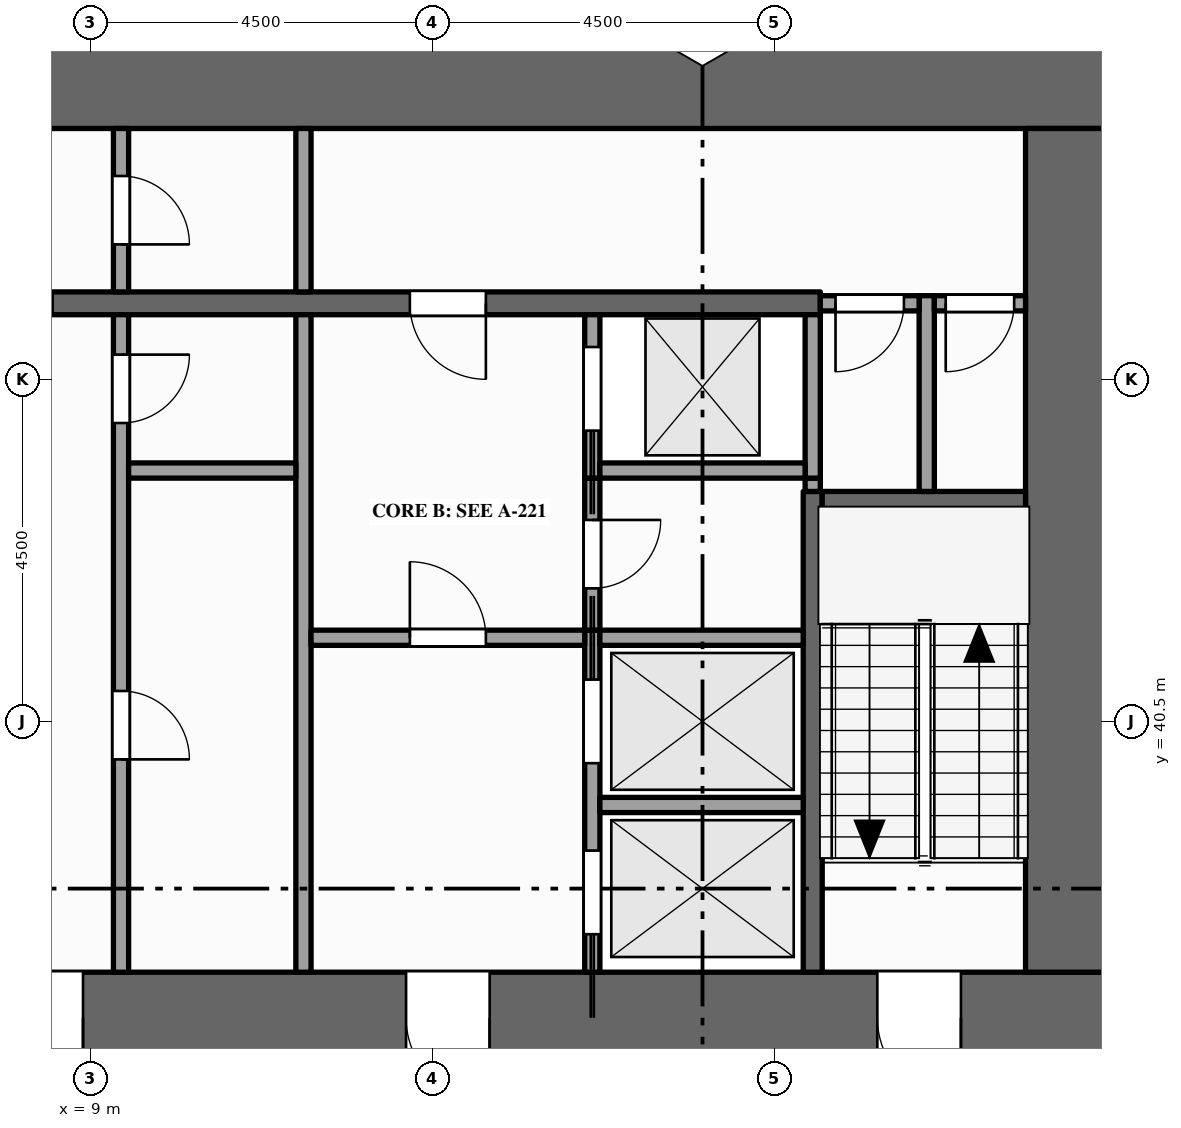
"""IFC4 building model, lengths in metres.
Left out: names, types, materials, properties, quantities, classifications, styles, units other than length and angle.
Written with IfcOpenShell. Run it as: python <this file> out.ifc"""

import sys

from ifc_helpers import new_model, si_unit, direction, frame, frame_2d, origin, place, context, subcontext, project, spatial, rectangle, extrude, element, fill, save


model = new_model("IFC4")
c1 = context("Model", 3, precision=1e-05, world=origin(), true_north=direction((0.0, 1.0)))
c2 = subcontext(c1, "Body", "Model", "MODEL_VIEW")
j1 = project(units=[si_unit("LENGTHUNIT", "METRE"), si_unit("PLANEANGLEUNIT", "RADIAN")], contexts=[c1])
p1 = place(None, origin())
s1 = spatial("IfcSite", under=j1, at=p1, CompositionType="ELEMENT")
p2 = place(p1, origin())
s2 = spatial("IfcBuilding", under=s1, at=p2, CompositionType="ELEMENT")
p3 = place(p2, frame((0.0, 0.0, 119.0)))
s3 = spatial("IfcBuildingStorey", under=s2, at=p3, CompositionType="ELEMENT", Elevation=119.0)
p4 = place(p3, frame((0.0, 36.6, -0.15), z_axis=(0.0, 0.0, 1.0), x_axis=(1.0, 0.0, 0.0)))
e1 = element("IfcWall", 1, at=p4, inside=s3, PredefinedType="SHEAR", context=c2, shape_type="SweptSolid", body=[
    extrude(rectangle(XDim=22.5, YDim=1.2, at=frame_2d((11.25, 0.0))), origin(), (0.0, 0.0, 1.0), 4.0),
])
p5 = place(p4, frame((7.1, 0.0, 0.15)))
e2 = element("IfcOpeningElement", 2, at=p5, cuts=e1, PredefinedType="OPENING", context=c2, shape_type="SweptSolid", body=[
    extrude(rectangle(XDim=1.8, YDim=2.1, at=frame_2d((0.9, 1.05))), frame((0.0, 0.61, 0.0), z_axis=(0.0, -1.0, 0.0), x_axis=(1.0, 0.0, 0.0)), (0.0, 0.0, 1.0), 1.22),
])
p6 = place(p4, frame((13.15, 0.0, 0.15)))
e3 = element("IfcOpeningElement", 3, at=p6, cuts=e1, PredefinedType="OPENING", context=c2, shape_type="SweptSolid", body=[
    extrude(rectangle(XDim=1.1, YDim=2.1, at=frame_2d((0.55, 1.05))), frame((0.0, 0.61, 0.0), z_axis=(0.0, -1.0, 0.0), x_axis=(1.0, 0.0, 0.0)), (0.0, 0.0, 1.0), 1.22),
])
p7 = place(p4, frame((2.15, 0.0, 0.15)))
e4 = element("IfcOpeningElement", 4, at=p7, cuts=e1, PredefinedType="OPENING", context=c2, shape_type="SweptSolid", body=[
    extrude(rectangle(XDim=1.1, YDim=2.1, at=frame_2d((0.55, 1.05))), frame((0.0, 0.61, 0.0), z_axis=(0.0, -1.0, 0.0), x_axis=(1.0, 0.0, 0.0)), (0.0, 0.0, 1.0), 1.22),
])
p8 = place(p4, frame((19.35, 0.0, 0.15)))
e5 = element("IfcOpeningElement", 5, at=p8, cuts=e1, PredefinedType="OPENING", context=c2, shape_type="SweptSolid", body=[
    extrude(rectangle(XDim=1.1, YDim=2.1, at=frame_2d((0.55, 1.05))), frame((0.0, 0.61, 0.0), z_axis=(0.0, -1.0, 0.0), x_axis=(1.0, 0.0, 0.0)), (0.0, 0.0, 1.0), 1.22),
])
p9 = place(p3, frame((0.0, 48.9, -0.15), z_axis=(0.0, 0.0, 1.0), x_axis=(1.0, 0.0, 0.0)))
e6 = element("IfcWall", 6, at=p9, inside=s3, PredefinedType="SHEAR", context=c2, shape_type="SweptSolid", body=[
    extrude(rectangle(XDim=22.5, YDim=1.2, at=frame_2d((11.25, 0.0))), origin(), (0.0, 0.0, 1.0), 4.0),
])
p10 = place(p3, frame((21.9, 37.2, -0.15), z_axis=(0.0, 0.0, 1.0), x_axis=(0.0, 1.0, 0.0)))
e7 = element("IfcWall", 7, at=p10, inside=s3, PredefinedType="SHEAR", context=c2, shape_type="SweptSolid", body=[
    extrude(rectangle(XDim=11.1, YDim=1.2, at=frame_2d((5.55, 0.0))), origin(), (0.0, 0.0, 1.0), 4.0),
])
p11 = place(p3, frame((9.4, 37.2, 0.0), z_axis=(0.0, 0.0, 1.0), x_axis=(0.0, 1.0, 0.0)))
e8 = element("IfcWall", 8, at=p11, inside=s3, PredefinedType="PARTITIONING", context=c2, shape_type="SweptSolid", body=[
    extrude(rectangle(XDim=8.65, YDim=0.2, at=frame_2d((4.325, 0.0))), origin(), (0.0, 0.0, 1.0), 3.85),
])
p12 = place(p11, frame((2.8, 0.0, 0.0)))
e9 = element("IfcOpeningElement", 9, at=p12, cuts=e8, PredefinedType="OPENING", context=c2, shape_type="SweptSolid", body=[
    extrude(rectangle(XDim=0.9, YDim=2.1, at=frame_2d((0.45, 1.05))), frame((0.0, 0.11, 0.0), z_axis=(0.0, -1.0, 0.0), x_axis=(1.0, 0.0, 0.0)), (0.0, 0.0, 1.0), 0.22),
])
p13 = place(p11, frame((7.225, 0.0, 0.0)))
e10 = element("IfcOpeningElement", 10, at=p13, cuts=e8, PredefinedType="OPENING", context=c2, shape_type="SweptSolid", body=[
    extrude(rectangle(XDim=0.9, YDim=2.1, at=frame_2d((0.45, 1.05))), frame((0.0, 0.11, 0.0), z_axis=(0.0, -1.0, 0.0), x_axis=(1.0, 0.0, 0.0)), (0.0, 0.0, 1.0), 0.22),
])
p14 = place(p3, frame((9.4, 46.15, 0.0), z_axis=(0.0, 0.0, 1.0), x_axis=(0.0, 1.0, 0.0)))
e11 = element("IfcWall", 11, at=p14, inside=s3, PredefinedType="PARTITIONING", context=c2, shape_type="SweptSolid", body=[
    extrude(rectangle(XDim=2.15, YDim=0.2, at=frame_2d((1.075, 0.0))), origin(), (0.0, 0.0, 1.0), 3.85),
])
p15 = place(p14, frame((0.625, 0.0, 0.0)))
e12 = element("IfcOpeningElement", 12, at=p15, cuts=e11, PredefinedType="OPENING", context=c2, shape_type="SweptSolid", body=[
    extrude(rectangle(XDim=0.9, YDim=2.1, at=frame_2d((0.45, 1.05))), frame((0.0, 0.11, 0.0), z_axis=(0.0, -1.0, 0.0), x_axis=(1.0, 0.0, 0.0)), (0.0, 0.0, 1.0), 0.22),
])
p16 = place(p3, frame((11.8, 37.2, 0.0), z_axis=(0.0, 0.0, 1.0), x_axis=(0.0, 1.0, 0.0)))
e13 = element("IfcWall", 13, at=p16, inside=s3, PredefinedType="PARTITIONING", context=c2, shape_type="SweptSolid", body=[
    extrude(rectangle(XDim=8.65, YDim=0.2, at=frame_2d((4.325, 0.0))), origin(), (0.0, 0.0, 1.0), 3.85),
])
p17 = place(p3, frame((11.8, 46.15, 0.0), z_axis=(0.0, 0.0, 1.0), x_axis=(0.0, 1.0, 0.0)))
e14 = element("IfcWall", 14, at=p17, inside=s3, PredefinedType="PARTITIONING", context=c2, shape_type="SweptSolid", body=[
    extrude(rectangle(XDim=2.15, YDim=0.2, at=frame_2d((1.075, 0.0))), origin(), (0.0, 0.0, 1.0), 3.85),
])
p18 = place(p3, frame((15.6, 37.2, 0.0), z_axis=(0.0, 0.0, 1.0), x_axis=(0.0, 1.0, 0.0)))
e15 = element("IfcWall", 15, at=p18, inside=s3, PredefinedType="SOLIDWALL", context=c2, shape_type="SweptSolid", body=[
    extrude(rectangle(XDim=4.5, YDim=0.2, at=frame_2d((2.25, 0.0))), origin(), (0.0, 0.0, 1.0), 3.85),
])
p19 = place(p18, frame((0.5, 0.0, 0.012)))
e16 = element("IfcOpeningElement", 16, at=p19, cuts=e15, PredefinedType="OPENING", context=c2, shape_type="SweptSolid", body=[
    extrude(rectangle(XDim=1.1, YDim=2.1, at=frame_2d((0.55, 1.05))), frame((0.0, 0.11, 0.0), z_axis=(0.0, -1.0, 0.0), x_axis=(1.0, 0.0, 0.0)), (0.0, 0.0, 1.0), 0.22),
])
p20 = place(p18, frame((2.75, 0.0, 0.012)))
e17 = element("IfcOpeningElement", 17, at=p20, cuts=e15, PredefinedType="OPENING", context=c2, shape_type="SweptSolid", body=[
    extrude(rectangle(XDim=1.1, YDim=2.1, at=frame_2d((0.55, 1.05))), frame((0.0, 0.11, 0.0), z_axis=(0.0, -1.0, 0.0), x_axis=(1.0, 0.0, 0.0)), (0.0, 0.0, 1.0), 0.22),
])
p21 = place(p3, frame((15.6, 41.7, 0.0), z_axis=(0.0, 0.0, 1.0), x_axis=(0.0, 1.0, 0.0)))
e18 = element("IfcWall", 18, at=p21, inside=s3, PredefinedType="PARTITIONING", context=c2, shape_type="SweptSolid", body=[
    extrude(rectangle(XDim=2.0, YDim=0.2, at=frame_2d((1.0, 0.0))), origin(), (0.0, 0.0, 1.0), 3.85),
])
p22 = place(p21, frame((0.55, 0.0, 0.0)))
e19 = element("IfcOpeningElement", 19, at=p22, cuts=e18, PredefinedType="OPENING", context=c2, shape_type="SweptSolid", body=[
    extrude(rectangle(XDim=0.9, YDim=2.1, at=frame_2d((0.45, 1.05))), frame((0.0, 0.11, 0.0), z_axis=(0.0, -1.0, 0.0), x_axis=(1.0, 0.0, 0.0)), (0.0, 0.0, 1.0), 0.22),
])
p23 = place(p3, frame((15.6, 43.7, 0.0), z_axis=(0.0, 0.0, 1.0), x_axis=(0.0, 1.0, 0.0)))
e20 = element("IfcWall", 20, at=p23, inside=s3, PredefinedType="SOLIDWALL", context=c2, shape_type="SweptSolid", body=[
    extrude(rectangle(XDim=2.15, YDim=0.2, at=frame_2d((1.075, 0.0))), origin(), (0.0, 0.0, 1.0), 3.85),
])
p24 = place(p23, frame((0.625, 0.0, 0.012)))
e21 = element("IfcOpeningElement", 21, at=p24, cuts=e20, PredefinedType="OPENING", context=c2, shape_type="SweptSolid", body=[
    extrude(rectangle(XDim=1.1, YDim=2.1, at=frame_2d((0.55, 1.05))), frame((0.0, 0.11, 0.0), z_axis=(0.0, -1.0, 0.0), x_axis=(1.0, 0.0, 0.0)), (0.0, 0.0, 1.0), 0.22),
])
p25 = place(p3, frame((18.5, 37.2, 0.0), z_axis=(0.0, 0.0, 1.0), x_axis=(0.0, 1.0, 0.0)))
e22 = element("IfcWall", 22, at=p25, inside=s3, PredefinedType="SHEAR", context=c2, shape_type="SweptSolid", body=[
    extrude(rectangle(XDim=6.325, YDim=0.25, at=frame_2d((3.163, 0.0))), origin(), (0.0, 0.0, 1.0), 3.85),
])
p26 = place(p3, frame((18.5, 43.525, 0.0), z_axis=(0.0, 0.0, 1.0), x_axis=(0.0, 1.0, 0.0)))
e23 = element("IfcWall", 23, at=p26, inside=s3, PredefinedType="PARTITIONING", context=c2, shape_type="SweptSolid", body=[
    extrude(rectangle(XDim=0.175, YDim=0.2, at=frame_2d((0.087, 0.0))), origin(), (0.0, 0.0, 1.0), 3.85),
])
p27 = place(p3, frame((18.5, 43.7, 0.0), z_axis=(0.0, 0.0, 1.0), x_axis=(0.0, 1.0, 0.0)))
e24 = element("IfcWall", 24, at=p27, inside=s3, PredefinedType="SOLIDWALL", context=c2, shape_type="SweptSolid", body=[
    extrude(rectangle(XDim=2.15, YDim=0.2, at=frame_2d((1.075, 0.0))), origin(), (0.0, 0.0, 1.0), 3.85),
])
p28 = place(p3, frame((20.0, 43.525, 0.0), z_axis=(0.0, 0.0, 1.0), x_axis=(0.0, 1.0, 0.0)))
e25 = element("IfcWall", 25, at=p28, inside=s3, PredefinedType="PARTITIONING", context=c2, shape_type="SweptSolid", body=[
    extrude(rectangle(XDim=2.575, YDim=0.2, at=frame_2d((1.288, 0.0))), origin(), (0.0, 0.0, 1.0), 3.85),
])
p29 = place(p3, frame((15.7, 39.4, 0.0), z_axis=(0.0, 0.0, 1.0), x_axis=(1.0, 0.0, 0.0)))
e26 = element("IfcWall", 26, at=p29, inside=s3, PredefinedType="SOLIDWALL", context=c2, shape_type="SweptSolid", body=[
    extrude(rectangle(XDim=2.675, YDim=0.2, at=frame_2d((1.337, 0.0))), origin(), (0.0, 0.0, 1.0), 3.85),
])
p30 = place(p3, frame((11.9, 41.6, 0.0), z_axis=(0.0, 0.0, 1.0), x_axis=(1.0, 0.0, 0.0)))
e27 = element("IfcWall", 27, at=p30, inside=s3, PredefinedType="PARTITIONING", context=c2, shape_type="SweptSolid", body=[
    extrude(rectangle(XDim=3.6, YDim=0.2, at=frame_2d((1.8, 0.0))), origin(), (0.0, 0.0, 1.0), 3.85),
])
p31 = place(p30, frame((1.3, 0.0, 0.0)))
e28 = element("IfcOpeningElement", 28, at=p31, cuts=e27, PredefinedType="OPENING", context=c2, shape_type="SweptSolid", body=[
    extrude(rectangle(XDim=1.0, YDim=2.1, at=frame_2d((0.5, 1.05))), frame((0.0, 0.11, 0.0), z_axis=(0.0, -1.0, 0.0), x_axis=(1.0, 0.0, 0.0)), (0.0, 0.0, 1.0), 0.22),
])
p32 = place(p3, frame((15.7, 41.6, 0.0), z_axis=(0.0, 0.0, 1.0), x_axis=(1.0, 0.0, 0.0)))
e29 = element("IfcWall", 29, at=p32, inside=s3, PredefinedType="SOLIDWALL", context=c2, shape_type="SweptSolid", body=[
    extrude(rectangle(XDim=2.675, YDim=0.2, at=frame_2d((1.337, 0.0))), origin(), (0.0, 0.0, 1.0), 3.85),
])
p33 = place(p3, frame((18.625, 43.4, 0.0), z_axis=(0.0, 0.0, 1.0), x_axis=(1.0, 0.0, 0.0)))
e30 = element("IfcWall", 30, at=p33, inside=s3, PredefinedType="SHEAR", context=c2, shape_type="SweptSolid", body=[
    extrude(rectangle(XDim=2.675, YDim=0.25, at=frame_2d((1.337, 0.0))), origin(), (0.0, 0.0, 1.0), 3.85),
])
p34 = place(p3, frame((9.5, 43.8, 0.0), z_axis=(0.0, 0.0, 1.0), x_axis=(1.0, 0.0, 0.0)))
e31 = element("IfcWall", 31, at=p34, inside=s3, PredefinedType="PARTITIONING", context=c2, shape_type="SweptSolid", body=[
    extrude(rectangle(XDim=2.2, YDim=0.2, at=frame_2d((1.1, 0.0))), origin(), (0.0, 0.0, 1.0), 3.85),
])
p35 = place(p3, frame((15.7, 43.8, 0.0), z_axis=(0.0, 0.0, 1.0), x_axis=(1.0, 0.0, 0.0)))
e32 = element("IfcWall", 32, at=p35, inside=s3, PredefinedType="SOLIDWALL", context=c2, shape_type="SweptSolid", body=[
    extrude(rectangle(XDim=2.7, YDim=0.2, at=frame_2d((1.35, 0.0))), origin(), (0.0, 0.0, 1.0), 3.85),
])
p36 = place(p3, frame((4.1, 46.0, 0.0), z_axis=(0.0, 0.0, 1.0), x_axis=(1.0, 0.0, 0.0)))
e33 = element("IfcWall", 33, at=p36, inside=s3, PredefinedType="SHEAR", context=c2, shape_type="SweptSolid", body=[
    extrude(rectangle(XDim=14.5, YDim=0.3, at=frame_2d((7.25, 0.0))), origin(), (0.0, 0.0, 1.0), 3.85),
])
p37 = place(p36, frame((3.4, 0.0, 0.0)))
e34 = element("IfcOpeningElement", 34, at=p37, cuts=e33, PredefinedType="OPENING", context=c2, shape_type="SweptSolid", body=[
    extrude(rectangle(XDim=1.0, YDim=2.1, at=frame_2d((0.5, 1.05))), frame((0.0, 0.16, 0.0), z_axis=(0.0, -1.0, 0.0), x_axis=(1.0, 0.0, 0.0)), (0.0, 0.0, 1.0), 0.32),
])
p38 = place(p36, frame((9.1, 0.0, 0.0)))
e35 = element("IfcOpeningElement", 35, at=p38, cuts=e33, PredefinedType="OPENING", context=c2, shape_type="SweptSolid", body=[
    extrude(rectangle(XDim=1.0, YDim=2.1, at=frame_2d((0.5, 1.05))), frame((0.0, 0.16, 0.0), z_axis=(0.0, -1.0, 0.0), x_axis=(1.0, 0.0, 0.0)), (0.0, 0.0, 1.0), 0.32),
])
p39 = place(p3, frame((18.6, 46.0, 0.0), z_axis=(0.0, 0.0, 1.0), x_axis=(1.0, 0.0, 0.0)))
e36 = element("IfcWall", 36, at=p39, inside=s3, PredefinedType="PARTITIONING", context=c2, shape_type="SweptSolid", body=[
    extrude(rectangle(XDim=1.3, YDim=0.2, at=frame_2d((0.65, 0.0))), origin(), (0.0, 0.0, 1.0), 3.85),
])
p40 = place(p39, frame((0.2, 0.0, 0.0)))
e37 = element("IfcOpeningElement", 37, at=p40, cuts=e36, PredefinedType="OPENING", context=c2, shape_type="SweptSolid", body=[
    extrude(rectangle(XDim=0.9, YDim=2.1, at=frame_2d((0.45, 1.05))), frame((0.0, 0.11, 0.0), z_axis=(0.0, -1.0, 0.0), x_axis=(1.0, 0.0, 0.0)), (0.0, 0.0, 1.0), 0.22),
])
p41 = place(p3, frame((20.1, 46.0, 0.0), z_axis=(0.0, 0.0, 1.0), x_axis=(1.0, 0.0, 0.0)))
e38 = element("IfcWall", 38, at=p41, inside=s3, PredefinedType="PARTITIONING", context=c2, shape_type="SweptSolid", body=[
    extrude(rectangle(XDim=1.2, YDim=0.2, at=frame_2d((0.6, 0.0))), origin(), (0.0, 0.0, 1.0), 3.85),
])
p42 = place(p41, frame((0.15, 0.0, 0.0)))
e39 = element("IfcOpeningElement", 39, at=p42, cuts=e38, PredefinedType="OPENING", context=c2, shape_type="SweptSolid", body=[
    extrude(rectangle(XDim=0.9, YDim=2.1, at=frame_2d((0.45, 1.05))), frame((0.0, 0.11, 0.0), z_axis=(0.0, -1.0, 0.0), x_axis=(1.0, 0.0, 0.0)), (0.0, 0.0, 1.0), 0.22),
])
p43 = place(p19, origin())
e40 = element("IfcDoor", 40, at=p43, inside=s3, OperationType="SLIDING_TO_LEFT", PredefinedType="DOOR", context=c2, shape_type="SweptSolid", body=[
    extrude(rectangle(XDim=1.1, YDim=2.1, at=frame_2d((0.55, 1.05))), frame((0.0, 0.025, 0.0), z_axis=(0.0, -1.0, 0.0), x_axis=(1.0, 0.0, 0.0)), (0.0, 0.0, 1.0), 0.05),
])
fill(e16, e40)
p44 = place(p20, origin())
e41 = element("IfcDoor", 41, at=p44, inside=s3, OperationType="SLIDING_TO_RIGHT", PredefinedType="DOOR", context=c2, shape_type="SweptSolid", body=[
    extrude(rectangle(XDim=1.1, YDim=2.1, at=frame_2d((0.55, 1.05))), frame((0.0, 0.025, 0.0), z_axis=(0.0, -1.0, 0.0), x_axis=(1.0, 0.0, 0.0)), (0.0, 0.0, 1.0), 0.05),
])
fill(e17, e41)
p45 = place(p24, origin())
e42 = element("IfcDoor", 42, at=p45, inside=s3, OperationType="SLIDING_TO_LEFT", PredefinedType="DOOR", context=c2, shape_type="SweptSolid", body=[
    extrude(rectangle(XDim=1.1, YDim=2.1, at=frame_2d((0.55, 1.05))), frame((0.0, 0.025, 0.0), z_axis=(0.0, -1.0, 0.0), x_axis=(1.0, 0.0, 0.0)), (0.0, 0.0, 1.0), 0.05),
])
fill(e21, e42)
p46 = place(p5, origin())
e43 = element("IfcDoor", 43, at=p46, inside=s3, OperationType="DOUBLE_DOOR_SINGLE_SWING", PredefinedType="DOOR", context=c2, shape_type="SweptSolid", body=[
    extrude(rectangle(XDim=1.8, YDim=2.1, at=frame_2d((0.9, 1.05))), frame((0.0, 0.025, 0.0), z_axis=(0.0, -1.0, 0.0), x_axis=(1.0, 0.0, 0.0)), (0.0, 0.0, 1.0), 0.05),
])
fill(e2, e43)
p47 = place(p6, origin())
e44 = element("IfcDoor", 44, at=p47, inside=s3, OperationType="SINGLE_SWING_RIGHT", PredefinedType="DOOR", context=c2, shape_type="SweptSolid", body=[
    extrude(rectangle(XDim=1.1, YDim=2.1, at=frame_2d((0.55, 1.05))), frame((0.0, 0.025, 0.0), z_axis=(0.0, -1.0, 0.0), x_axis=(1.0, 0.0, 0.0)), (0.0, 0.0, 1.0), 0.05),
])
fill(e3, e44)
p48 = place(p31, origin())
e45 = element("IfcDoor", 45, at=p48, inside=s3, OperationType="SINGLE_SWING_LEFT", PredefinedType="DOOR", context=c2, shape_type="SweptSolid", body=[
    extrude(rectangle(XDim=1.0, YDim=2.1, at=frame_2d((0.5, 1.05))), frame((0.0, 0.025, 0.0), z_axis=(0.0, -1.0, 0.0), x_axis=(1.0, 0.0, 0.0)), (0.0, 0.0, 1.0), 0.05),
])
fill(e28, e45)
p49 = place(p38, origin())
e46 = element("IfcDoor", 46, at=p49, inside=s3, OperationType="SINGLE_SWING_RIGHT", PredefinedType="DOOR", context=c2, shape_type="SweptSolid", body=[
    extrude(rectangle(XDim=1.0, YDim=2.1, at=frame_2d((0.5, 1.05))), frame((0.0, 0.025, 0.0), z_axis=(0.0, -1.0, 0.0), x_axis=(1.0, 0.0, 0.0)), (0.0, 0.0, 1.0), 0.05),
])
fill(e35, e46)
p50 = place(p15, origin())
e47 = element("IfcDoor", 47, at=p50, inside=s3, OperationType="SINGLE_SWING_LEFT", PredefinedType="DOOR", context=c2, shape_type="SweptSolid", body=[
    extrude(rectangle(XDim=0.9, YDim=2.1, at=frame_2d((0.45, 1.05))), frame((0.0, 0.025, 0.0), z_axis=(0.0, -1.0, 0.0), x_axis=(1.0, 0.0, 0.0)), (0.0, 0.0, 1.0), 0.05),
])
fill(e12, e47)
p51 = place(p8, origin())
e48 = element("IfcDoor", 48, at=p51, inside=s3, OperationType="SINGLE_SWING_RIGHT", PredefinedType="DOOR", context=c2, shape_type="SweptSolid", body=[
    extrude(rectangle(XDim=1.1, YDim=2.1, at=frame_2d((0.55, 1.05))), frame((0.0, 0.025, 0.0), z_axis=(0.0, -1.0, 0.0), x_axis=(1.0, 0.0, 0.0)), (0.0, 0.0, 1.0), 0.05),
])
fill(e5, e48)
p52 = place(p40, origin())
e49 = element("IfcDoor", 49, at=p52, inside=s3, OperationType="SINGLE_SWING_LEFT", PredefinedType="DOOR", context=c2, shape_type="SweptSolid", body=[
    extrude(rectangle(XDim=0.9, YDim=2.1, at=frame_2d((0.45, 1.05))), frame((0.0, 0.025, 0.0), z_axis=(0.0, -1.0, 0.0), x_axis=(1.0, 0.0, 0.0)), (0.0, 0.0, 1.0), 0.05),
])
fill(e37, e49)
p53 = place(p42, origin())
e50 = element("IfcDoor", 50, at=p53, inside=s3, OperationType="SINGLE_SWING_LEFT", PredefinedType="DOOR", context=c2, shape_type="SweptSolid", body=[
    extrude(rectangle(XDim=0.9, YDim=2.1, at=frame_2d((0.45, 1.05))), frame((0.0, 0.025, 0.0), z_axis=(0.0, -1.0, 0.0), x_axis=(1.0, 0.0, 0.0)), (0.0, 0.0, 1.0), 0.05),
])
fill(e39, e50)
p54 = place(p12, origin())
e51 = element("IfcDoor", 51, at=p54, inside=s3, OperationType="SINGLE_SWING_LEFT", PredefinedType="DOOR", context=c2, shape_type="SweptSolid", body=[
    extrude(rectangle(XDim=0.9, YDim=2.1, at=frame_2d((0.45, 1.05))), frame((0.0, 0.025, 0.0), z_axis=(0.0, -1.0, 0.0), x_axis=(1.0, 0.0, 0.0)), (0.0, 0.0, 1.0), 0.05),
])
fill(e9, e51)
p55 = place(p13, origin())
e52 = element("IfcDoor", 52, at=p55, inside=s3, OperationType="SINGLE_SWING_RIGHT", PredefinedType="DOOR", context=c2, shape_type="SweptSolid", body=[
    extrude(rectangle(XDim=0.9, YDim=2.1, at=frame_2d((0.45, 1.05))), frame((0.0, 0.025, 0.0), z_axis=(0.0, -1.0, 0.0), x_axis=(1.0, 0.0, 0.0)), (0.0, 0.0, 1.0), 0.05),
])
fill(e10, e52)
p56 = place(p22, origin())
e53 = element("IfcDoor", 53, at=p56, inside=s3, OperationType="SINGLE_SWING_RIGHT", PredefinedType="DOOR", context=c2, shape_type="SweptSolid", body=[
    extrude(rectangle(XDim=0.9, YDim=2.1, at=frame_2d((0.45, 1.05))), frame((0.0, 0.025, 0.0), z_axis=(0.0, -1.0, 0.0), x_axis=(1.0, 0.0, 0.0)), (0.0, 0.0, 1.0), 0.05),
])
fill(e19, e53)
save(model, sys.argv[1])
